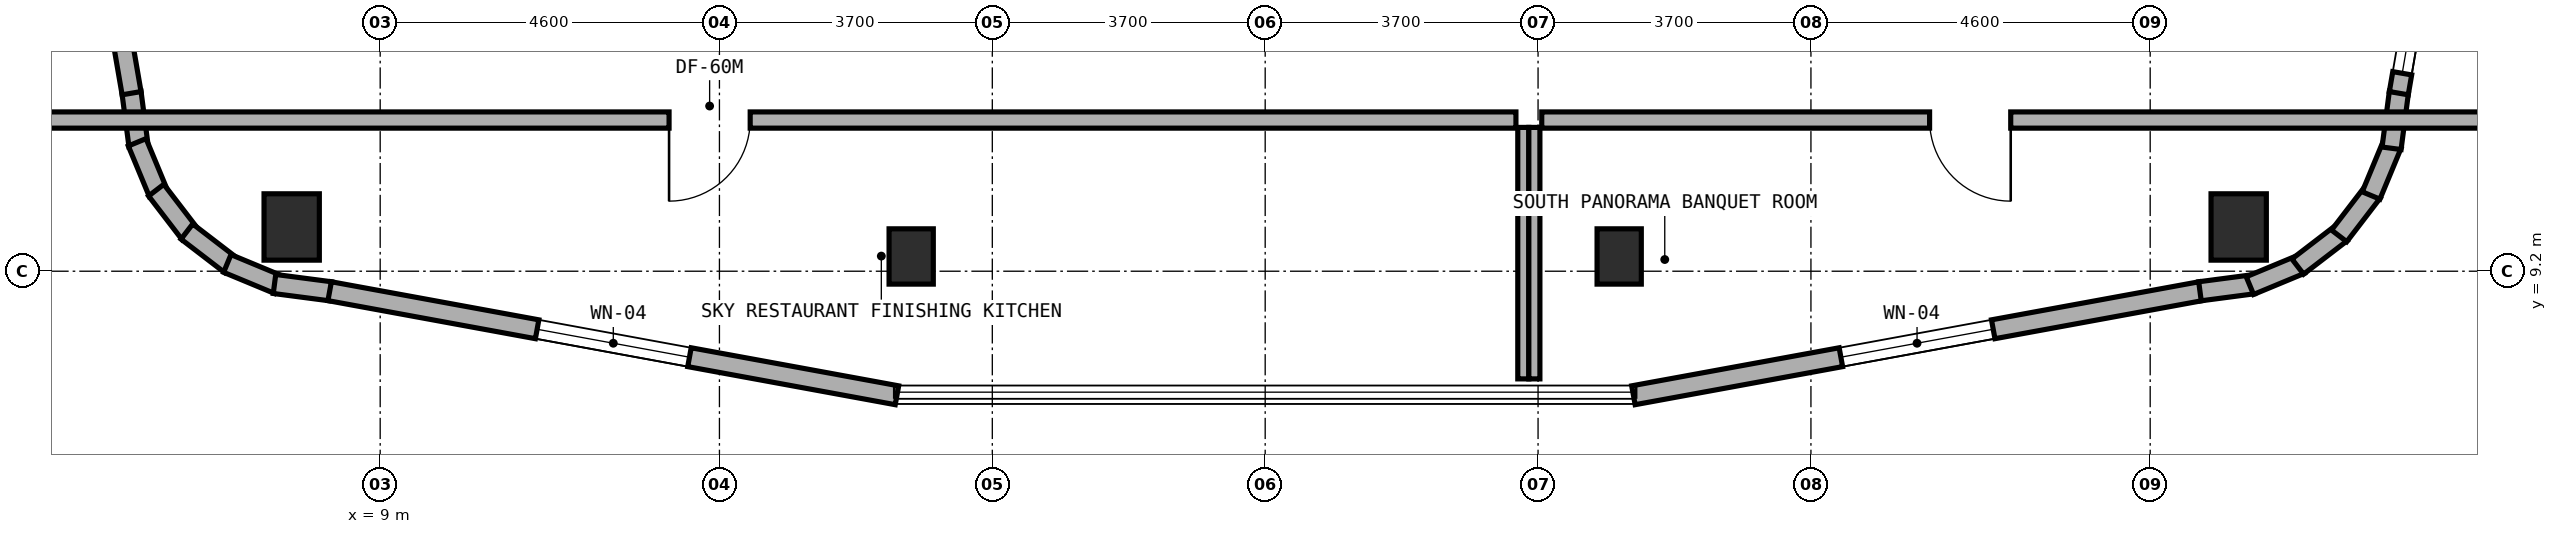
"""IFC4 building model, lengths in metres.
Left out: names, types, materials, properties, quantities, classifications, styles, units other than length and angle.
Written with IfcOpenShell. Run it as: python <this file> out.ifc"""

import sys

from ifc_helpers import new_model, si_unit, direction, frame, frame_2d, origin, origin_2d, place, context, subcontext, project, spatial, rectangle, extrude, element, fill, save


model = new_model("IFC4")
c1 = context("Model", 3, precision=1e-05, world=origin(), true_north=direction((0.0, 1.0)))
c2 = subcontext(c1, "Body", "Model", "MODEL_VIEW")
j1 = project(units=[si_unit("LENGTHUNIT", "METRE"), si_unit("PLANEANGLEUNIT", "RADIAN")], contexts=[c1])
p1 = place(None, origin())
s1 = spatial("IfcSite", under=j1, at=p1, CompositionType="ELEMENT")
p2 = place(p1, origin())
s2 = spatial("IfcBuilding", under=s1, at=p2, CompositionType="ELEMENT")
p3 = place(p2, frame((0.0, 0.0, 264.8)))
s3 = spatial("IfcBuildingStorey", under=s2, at=p3, CompositionType="ELEMENT", Elevation=264.8)
for number, where, z_axis, x_axis in (
    (1, (16.2, 9.4, 0.0), (0.0, 0.0, 1.0), (1.0, 0.0, 0.0)),
    (2, (25.8, 9.4, 0.0), (0.0, 0.0, 1.0), (1.0, 0.0, 0.0)),
):
    element("IfcColumn", number, at=place(p3, frame(where, z_axis=z_axis, x_axis=x_axis)), inside=s3, PredefinedType="COLUMN", context=c2, shape_type="SweptSolid", body=[
        extrude(rectangle(XDim=0.6, YDim=0.75, at=origin_2d()), origin(), (0.0, 0.0, 1.0), 3.6),
    ])
for number, where, z_axis, x_axis in (
    (3, (7.8, 9.8, 0.0), (0.0, 0.0, 1.0), (1.0, 0.0, 0.0)),
    (4, (34.2, 9.8, 0.0), (0.0, 0.0, 1.0), (1.0, 0.0, 0.0)),
):
    element("IfcColumn", number, at=place(p3, frame(where, z_axis=z_axis, x_axis=x_axis)), inside=s3, PredefinedType="COLUMN", context=c2, shape_type="SweptSolid", body=[
        extrude(rectangle(XDim=0.75, YDim=0.9, at=origin_2d()), origin(), (0.0, 0.0, 1.0), 3.6),
    ])
p4 = place(p3, frame((5.628, 11.625, 0.0), z_axis=(0.0, 0.0, 1.0), x_axis=(0.130255288807, -0.991480488834, 0.0)))
e5 = element("IfcWall", 5, at=p4, inside=s3, PredefinedType="STANDARD", context=c2, shape_type="SweptSolid", body=[
    extrude(rectangle(XDim=0.729, YDim=0.26, at=frame_2d((0.365, 0.0))), origin(), (0.0, 0.0, 1.0), 3.32),
])
p5 = place(p3, frame((5.705, 10.948, 0.0), z_axis=(0.0, 0.0, 1.0), x_axis=(0.383267045233, -0.923637576129, 0.0)))
e6 = element("IfcWall", 6, at=p5, inside=s3, PredefinedType="STANDARD", context=c2, shape_type="SweptSolid", body=[
    extrude(rectangle(XDim=0.746, YDim=0.26, at=frame_2d((0.373, 0.0))), origin(), (0.0, 0.0, 1.0), 3.32),
])
for number, where, z_axis, x_axis in (
    (7, (5.963, 10.299, 0.0), (0.0, 0.0, 1.0), (0.609, -0.793, 0.0)),
    (8, (6.379, 9.738, 0.0), (0.0, 0.0, 1.0), (0.793, -0.609, 0.0)),
):
    element("IfcWall", number, at=place(p3, frame(where, z_axis=z_axis, x_axis=x_axis)), inside=s3, PredefinedType="STANDARD", context=c2, shape_type="SweptSolid", body=[
        extrude(rectangle(XDim=0.746, YDim=0.26, at=frame_2d((0.373, 0.0))), origin(), (0.0, 0.0, 1.0), 3.32),
    ])
p6 = place(p3, frame((6.927, 9.305, 0.0), z_axis=(0.0, 0.0, 1.0), x_axis=(0.923637576129, -0.383267045233, 0.0)))
e9 = element("IfcWall", 9, at=p6, inside=s3, PredefinedType="STANDARD", context=c2, shape_type="SweptSolid", body=[
    extrude(rectangle(XDim=0.746, YDim=0.26, at=frame_2d((0.373, 0.0))), origin(), (0.0, 0.0, 1.0), 3.32),
])
p7 = place(p3, frame((7.567, 9.027, 0.0), z_axis=(0.0, 0.0, 1.0), x_axis=(0.991559404866, -0.129653178221, 0.0)))
e10 = element("IfcWall", 10, at=p7, inside=s3, PredefinedType="STANDARD", context=c2, shape_type="SweptSolid", body=[
    extrude(rectangle(XDim=0.764, YDim=0.26, at=frame_2d((0.382, 0.0))), origin(), (0.0, 0.0, 1.0), 3.32),
])
p8 = place(p3, frame((8.315, 8.929, 0.0), z_axis=(0.0, 0.0, 1.0), x_axis=(0.983591511167, -0.180409919797, 0.0)))
e11 = element("IfcWall", 11, at=p8, inside=s3, PredefinedType="STANDARD", context=c2, shape_type="SweptSolid", body=[
    extrude(rectangle(XDim=7.821, YDim=0.26, at=frame_2d((3.91, 0.0))), origin(), (0.0, 0.0, 1.0), 3.32),
])
p9 = place(p8, frame((2.86, 0.0, 0.85)))
e12 = element("IfcOpeningElement", 12, at=p9, cuts=e11, PredefinedType="OPENING", context=c2, shape_type="SweptSolid", body=[
    extrude(rectangle(XDim=2.1, YDim=1.5, at=frame_2d((1.05, 0.75))), frame((0.0, 0.14, 0.0), z_axis=(0.0, -1.0, 0.0), x_axis=(1.0, 0.0, 0.0)), (0.0, 0.0, 1.0), 0.28),
])
p10 = place(p3, frame((25.993, 7.518, 0.0), z_axis=(0.0, 0.0, 1.0), x_axis=(0.983591511167, 0.180409919797, 0.0)))
e13 = element("IfcWall", 13, at=p10, inside=s3, PredefinedType="STANDARD", context=c2, shape_type="SweptSolid", body=[
    extrude(rectangle(XDim=7.821, YDim=0.26, at=frame_2d((3.91, 0.0))), origin(), (0.0, 0.0, 1.0), 3.32),
])
p11 = place(p10, frame((2.86, 0.0, 0.85)))
e14 = element("IfcOpeningElement", 14, at=p11, cuts=e13, PredefinedType="OPENING", context=c2, shape_type="SweptSolid", body=[
    extrude(rectangle(XDim=2.1, YDim=1.5, at=frame_2d((1.05, 0.75))), frame((0.0, 0.14, 0.0), z_axis=(0.0, -1.0, 0.0), x_axis=(1.0, 0.0, 0.0)), (0.0, 0.0, 1.0), 0.28),
])
p12 = place(p3, frame((33.675, 8.928, 0.0), z_axis=(0.0, 0.0, 1.0), x_axis=(0.991480488834, 0.130255288807, 0.0)))
e15 = element("IfcWall", 15, at=p12, inside=s3, PredefinedType="STANDARD", context=c2, shape_type="SweptSolid", body=[
    extrude(rectangle(XDim=0.729, YDim=0.26, at=frame_2d((0.365, 0.0))), origin(), (0.0, 0.0, 1.0), 3.32),
])
for number, where, z_axis, x_axis in (
    (16, (34.352, 9.005, 0.0), (0.0, 0.0, 1.0), (0.924, 0.384, 0.0)),
    (17, (35.001, 9.263, 0.0), (0.0, 0.0, 1.0), (0.793, 0.609, 0.0)),
    (18, (35.562, 9.679, 0.0), (0.0, 0.0, 1.0), (0.609, 0.793, 0.0)),
):
    element("IfcWall", number, at=place(p3, frame(where, z_axis=z_axis, x_axis=x_axis)), inside=s3, PredefinedType="STANDARD", context=c2, shape_type="SweptSolid", body=[
        extrude(rectangle(XDim=0.746, YDim=0.26, at=frame_2d((0.373, 0.0))), origin(), (0.0, 0.0, 1.0), 3.32),
    ])
p13 = place(p3, frame((35.995, 10.227, 0.0), z_axis=(0.0, 0.0, 1.0), x_axis=(0.383267045233, 0.923637576129, 0.0)))
e19 = element("IfcWall", 19, at=p13, inside=s3, PredefinedType="STANDARD", context=c2, shape_type="SweptSolid", body=[
    extrude(rectangle(XDim=0.746, YDim=0.26, at=frame_2d((0.373, 0.0))), origin(), (0.0, 0.0, 1.0), 3.32),
])
p14 = place(p3, frame((36.273, 10.867, 0.0), z_axis=(0.0, 0.0, 1.0), x_axis=(0.129653178221, 0.991559404866, 0.0)))
e20 = element("IfcWall", 20, at=p14, inside=s3, PredefinedType="STANDARD", context=c2, shape_type="SweptSolid", body=[
    extrude(rectangle(XDim=0.764, YDim=0.26, at=frame_2d((0.382, 0.0))), origin(), (0.0, 0.0, 1.0), 3.32),
])
p15 = place(p3, frame((36.371, 11.614, 0.0), z_axis=(0.0, 0.0, 1.0), x_axis=(0.169818291056, 0.985475391891, 0.0)))
e21 = element("IfcWall", 21, at=p15, inside=s3, PredefinedType="STANDARD", context=c2, shape_type="SweptSolid", body=[
    extrude(rectangle(XDim=8.302, YDim=0.26, at=frame_2d((4.151, 0.0))), origin(), (0.0, 0.0, 1.0), 3.32),
])
p16 = place(p15, frame((0.274, 0.0, 0.5)))
e22 = element("IfcOpeningElement", 22, at=p16, cuts=e21, PredefinedType="OPENING", context=c2, shape_type="SweptSolid", body=[
    extrude(rectangle(XDim=1.2, YDim=1.9, at=frame_2d((0.6, 0.95))), frame((0.0, 0.14, 0.0), z_axis=(0.0, -1.0, 0.0), x_axis=(1.0, 0.0, 0.0)), (0.0, 0.0, 1.0), 0.28),
])
p17 = place(p15, frame((4.09, 0.0, 0.85)))
e23 = element("IfcOpeningElement", 23, at=p17, cuts=e21, PredefinedType="OPENING", context=c2, shape_type="SweptSolid", body=[
    extrude(rectangle(XDim=2.1, YDim=1.5, at=frame_2d((1.05, 0.75))), frame((0.0, 0.14, 0.0), z_axis=(0.0, -1.0, 0.0), x_axis=(1.0, 0.0, 0.0)), (0.0, 0.0, 1.0), 0.28),
])
p18 = place(p3, frame((4.219, 19.796, 0.0), z_axis=(0.0, 0.0, 1.0), x_axis=(0.169818291056, -0.985475391891, 0.0)))
e24 = element("IfcWall", 24, at=p18, inside=s3, PredefinedType="STANDARD", context=c2, shape_type="SweptSolid", body=[
    extrude(rectangle(XDim=8.302, YDim=0.26, at=frame_2d((4.151, 0.0))), origin(), (0.0, 0.0, 1.0), 3.32),
])
p19 = place(p18, frame((0.288, 0.0, 0.85)))
e25 = element("IfcOpeningElement", 25, at=p19, cuts=e24, PredefinedType="OPENING", context=c2, shape_type="SweptSolid", body=[
    extrude(rectangle(XDim=1.5, YDim=1.5, at=frame_2d((0.75, 0.75))), frame((0.0, 0.14, 0.0), z_axis=(0.0, -1.0, 0.0), x_axis=(1.0, 0.0, 0.0)), (0.0, 0.0, 1.0), 0.28),
])
p20 = place(p18, frame((4.248, 0.0, 0.85)))
e26 = element("IfcOpeningElement", 26, at=p20, cuts=e24, PredefinedType="OPENING", context=c2, shape_type="SweptSolid", body=[
    extrude(rectangle(XDim=2.1, YDim=1.5, at=frame_2d((1.05, 0.75))), frame((0.0, 0.14, 0.0), z_axis=(0.0, -1.0, 0.0), x_axis=(1.0, 0.0, 0.0)), (0.0, 0.0, 1.0), 0.28),
])
p21 = place(p3, frame((24.5, 7.74, 0.0), z_axis=(0.0, 0.0, 1.0), x_axis=(0.0, 1.0, 0.0)))
e27 = element("IfcWall", 27, at=p21, inside=s3, PredefinedType="PARTITIONING", context=c2, shape_type="SweptSolid", body=[
    extrude(rectangle(XDim=3.41, YDim=0.15, at=frame_2d((1.705, 0.0))), origin(), (0.0, 0.0, 1.0), 3.015),
])
p22 = place(p3, frame((4.44, 11.25, 0.0), z_axis=(0.0, 0.0, 1.0), x_axis=(1.0, 0.0, 0.0)))
e28 = element("IfcWall", 28, at=p22, inside=s3, PredefinedType="SOLIDWALL", context=c2, shape_type="SweptSolid", body=[
    extrude(rectangle(XDim=19.96, YDim=0.22, at=frame_2d((9.98, 0.0))), origin(), (0.0, 0.0, 1.0), 2.795),
])
p23 = place(p22, frame((8.477, 0.0, 0.0)))
e29 = element("IfcOpeningElement", 29, at=p23, cuts=e28, PredefinedType="OPENING", context=c2, shape_type="SweptSolid", body=[
    extrude(rectangle(XDim=1.1, YDim=2.1, at=frame_2d((0.55, 1.05))), frame((0.0, 0.12, 0.0), z_axis=(0.0, -1.0, 0.0), x_axis=(1.0, 0.0, 0.0)), (0.0, 0.0, 1.0), 0.24),
])
p24 = place(p3, frame((24.65, 7.74, 0.0), z_axis=(0.0, 0.0, 1.0), x_axis=(0.0, 1.0, 0.0)))
e30 = element("IfcWall", 30, at=p24, inside=s3, PredefinedType="PARTITIONING", context=c2, shape_type="SweptSolid", body=[
    extrude(rectangle(XDim=3.41, YDim=0.15, at=frame_2d((1.705, 0.0))), origin(), (0.0, 0.0, 1.0), 3.015),
])
p25 = place(p3, frame((24.75, 11.25, 0.0), z_axis=(0.0, 0.0, 1.0), x_axis=(1.0, 0.0, 0.0)))
e31 = element("IfcWall", 31, at=p25, inside=s3, PredefinedType="SOLIDWALL", context=c2, shape_type="SweptSolid", body=[
    extrude(rectangle(XDim=12.81, YDim=0.22, at=frame_2d((6.405, 0.0))), origin(), (0.0, 0.0, 1.0), 2.795),
])
p26 = place(p25, frame((5.259, 0.0, 0.0)))
e32 = element("IfcOpeningElement", 32, at=p26, cuts=e31, PredefinedType="OPENING", context=c2, shape_type="SweptSolid", body=[
    extrude(rectangle(XDim=1.1, YDim=2.1, at=frame_2d((0.55, 1.05))), frame((0.0, 0.12, 0.0), z_axis=(0.0, -1.0, 0.0), x_axis=(1.0, 0.0, 0.0)), (0.0, 0.0, 1.0), 0.24),
])
p27 = place(p9, origin())
e33 = element("IfcWindow", 33, at=p27, inside=s3, PartitioningType="SINGLE_PANEL", PredefinedType="WINDOW", context=c2, shape_type="SweptSolid", body=[
    extrude(rectangle(XDim=2.1, YDim=1.5, at=frame_2d((1.05, 0.75))), frame((0.0, 0.03, 0.0), z_axis=(0.0, -1.0, 0.0), x_axis=(1.0, 0.0, 0.0)), (0.0, 0.0, 1.0), 0.06),
])
fill(e12, e33)
p28 = place(p11, origin())
e34 = element("IfcWindow", 34, at=p28, inside=s3, PartitioningType="SINGLE_PANEL", PredefinedType="WINDOW", context=c2, shape_type="SweptSolid", body=[
    extrude(rectangle(XDim=2.1, YDim=1.5, at=frame_2d((1.05, 0.75))), frame((0.0, 0.03, 0.0), z_axis=(0.0, -1.0, 0.0), x_axis=(1.0, 0.0, 0.0)), (0.0, 0.0, 1.0), 0.06),
])
fill(e14, e34)
p29 = place(p16, origin())
e35 = element("IfcWindow", 35, at=p29, inside=s3, PartitioningType="SINGLE_PANEL", PredefinedType="WINDOW", context=c2, shape_type="SweptSolid", body=[
    extrude(rectangle(XDim=1.2, YDim=1.9, at=frame_2d((0.6, 0.95))), frame((0.0, 0.03, 0.0), z_axis=(0.0, -1.0, 0.0), x_axis=(1.0, 0.0, 0.0)), (0.0, 0.0, 1.0), 0.06),
])
fill(e22, e35)
p30 = place(p23, frame((1.1, 0.0, 0.0), z_axis=(0.0, 0.0, 1.0), x_axis=(-1.0, 0.0, 0.0)))
e36 = element("IfcDoor", 36, at=p30, inside=s3, OperationType="SINGLE_SWING_RIGHT", PredefinedType="DOOR", context=c2, shape_type="SweptSolid", body=[
    extrude(rectangle(XDim=1.1, YDim=2.1, at=frame_2d((0.55, 1.05))), frame((0.0, 0.025, 0.0), z_axis=(0.0, -1.0, 0.0), x_axis=(1.0, 0.0, 0.0)), (0.0, 0.0, 1.0), 0.05),
])
fill(e29, e36)
p31 = place(p26, frame((1.1, 0.0, 0.0), z_axis=(0.0, 0.0, 1.0), x_axis=(-1.0, 0.0, 0.0)))
e37 = element("IfcDoor", 37, at=p31, inside=s3, OperationType="SINGLE_SWING_LEFT", PredefinedType="DOOR", context=c2, shape_type="SweptSolid", body=[
    extrude(rectangle(XDim=1.1, YDim=2.1, at=frame_2d((0.55, 1.05))), frame((0.0, 0.025, 0.0), z_axis=(0.0, -1.0, 0.0), x_axis=(1.0, 0.0, 0.0)), (0.0, 0.0, 1.0), 0.05),
])
fill(e32, e37)
save(model, sys.argv[1])
